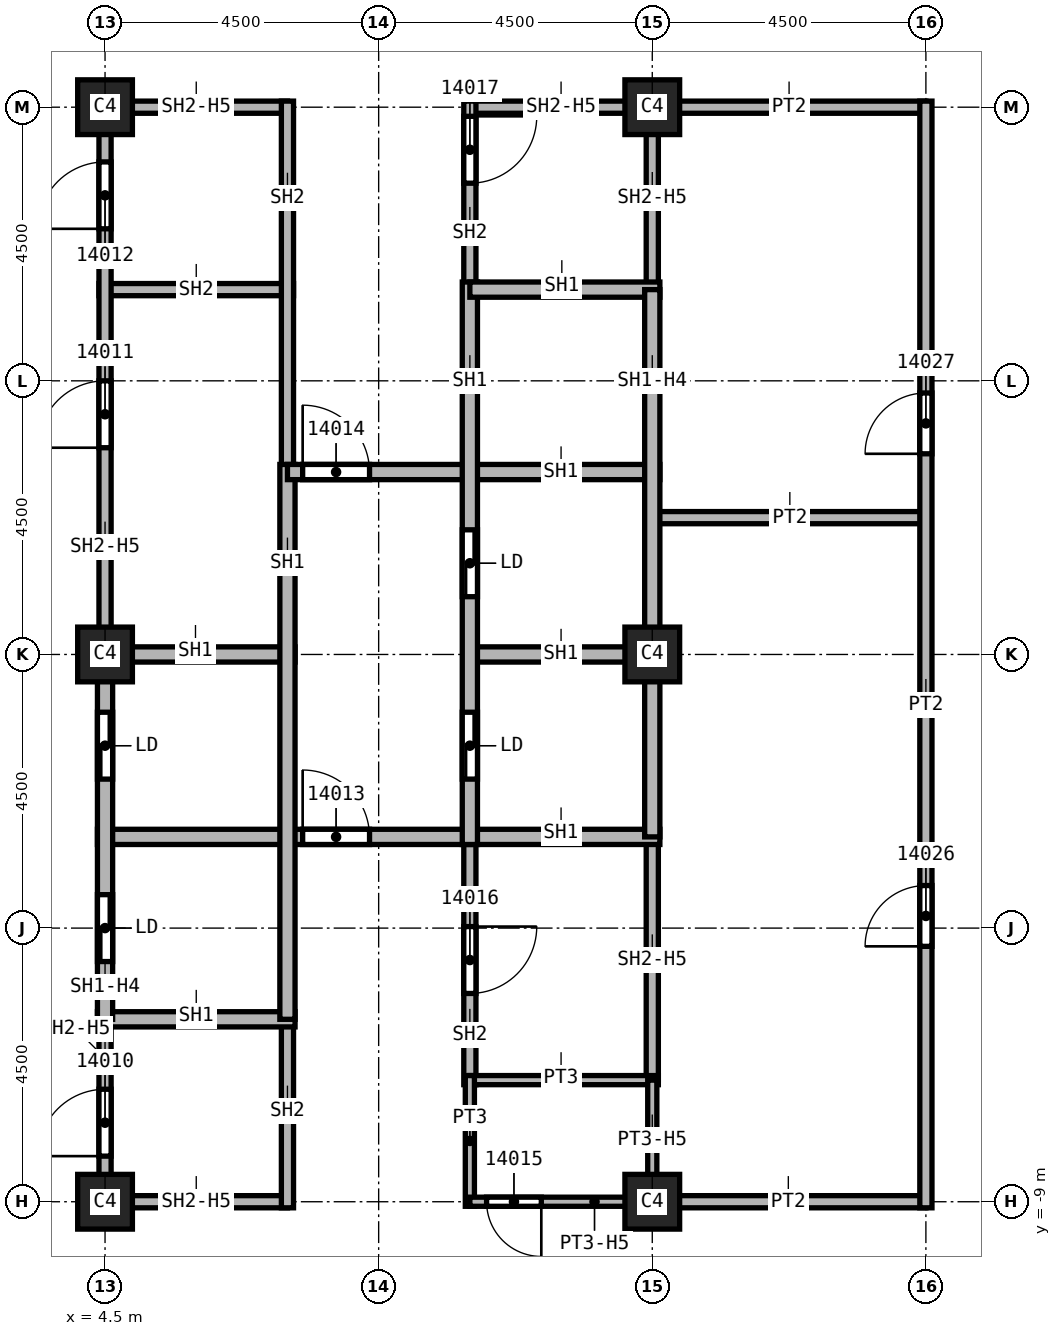
"""IFC4 building model, lengths in metres.
Left out: names, types, materials, properties, quantities, classifications, styles, units other than length and angle.
Written with IfcOpenShell. Run it as: python <this file> out.ifc"""

import sys

from ifc_helpers import new_model, si_unit, direction, frame, frame_2d, origin, origin_2d, place, context, subcontext, project, spatial, rectangle, extrude, element, fill, save


model = new_model("IFC4")
c1 = context("Model", 3, precision=1e-05, world=origin(), true_north=direction((0.0, 1.0)))
c2 = subcontext(c1, "Body", "Model", "MODEL_VIEW")
j1 = project(units=[si_unit("LENGTHUNIT", "METRE"), si_unit("PLANEANGLEUNIT", "RADIAN")], contexts=[c1])
p1 = place(None, origin())
s1 = spatial("IfcSite", under=j1, at=p1, CompositionType="ELEMENT")
p2 = place(p1, origin())
s2 = spatial("IfcBuilding", under=s1, at=p2, CompositionType="ELEMENT")
p3 = place(p2, frame((0.0, 0.0, 224.0)))
s3 = spatial("IfcBuildingStorey", under=s2, at=p3, CompositionType="ELEMENT", Elevation=224.0)
for number, where, z_axis, x_axis in (
    (1, (4.5, 0.0, 0.0), (0.0, 0.0, 1.0), (1.0, 0.0, 0.0)),
    (2, (4.5, 9.0, 0.0), (0.0, 0.0, 1.0), (1.0, 0.0, 0.0)),
    (3, (4.5, -9.0, 0.0), (0.0, 0.0, 1.0), (1.0, 0.0, 0.0)),
    (4, (13.5, 0.0, 0.0), (0.0, 0.0, 1.0), (1.0, 0.0, 0.0)),
    (5, (13.5, 9.0, 0.0), (0.0, 0.0, 1.0), (1.0, 0.0, 0.0)),
    (6, (13.5, -9.0, 0.0), (0.0, 0.0, 1.0), (1.0, 0.0, 0.0)),
):
    element("IfcColumn", number, at=place(p3, frame(where, z_axis=z_axis, x_axis=x_axis)), inside=s3, PredefinedType="COLUMN", context=c2, shape_type="SweptSolid", body=[
        extrude(rectangle(XDim=0.9, YDim=0.9, at=origin_2d()), origin(), (0.0, 0.0, 1.0), 3.72),
    ])
for number, where, z_axis, x_axis in (
    (7, (13.5, -9.0, 0.0), (0.0, 0.0, 1.0), (1.0, 0.0, 0.0)),
    (8, (13.5, 2.25, 0.0), (0.0, 0.0, 1.0), (1.0, 0.0, 0.0)),
    (9, (18.0, 9.0, 0.0), (0.0, 0.0, 1.0), (-1.0, 0.0, 0.0)),
):
    element("IfcWall", number, at=place(p3, frame(where, z_axis=z_axis, x_axis=x_axis)), inside=s3, PredefinedType="PARTITIONING", context=c2, shape_type="SweptSolid", body=[
        extrude(rectangle(XDim=4.5, YDim=0.2, at=frame_2d((2.25, 0.0))), origin(), (0.0, 0.0, 1.0), 3.72),
    ])
p4 = place(p3, frame((18.0, -9.1, 0.0), z_axis=(0.0, 0.0, 1.0), x_axis=(0.0, 1.0, 0.0)))
e10 = element("IfcWall", 10, at=p4, inside=s3, PredefinedType="PARTITIONING", context=c2, shape_type="SweptSolid", body=[
    extrude(rectangle(XDim=18.2, YDim=0.2, at=frame_2d((9.1, 0.0))), origin(), (0.0, 0.0, 1.0), 3.72),
])
p5 = place(p4, frame((4.3, 0.0, 0.0)))
e11 = element("IfcOpeningElement", 11, at=p5, cuts=e10, PredefinedType="OPENING", context=c2, shape_type="SweptSolid", body=[
    extrude(rectangle(XDim=1.0, YDim=2.1, at=frame_2d((0.5, 1.05))), frame((0.0, 0.1, 0.0), z_axis=(0.0, -1.0, 0.0), x_axis=(1.0, 0.0, 0.0)), (0.0, 0.0, 1.0), 0.2),
])
p6 = place(p4, frame((12.4, 0.0, 0.0)))
e12 = element("IfcOpeningElement", 12, at=p6, cuts=e10, PredefinedType="OPENING", context=c2, shape_type="SweptSolid", body=[
    extrude(rectangle(XDim=1.0, YDim=2.1, at=frame_2d((0.5, 1.05))), frame((0.0, 0.1, 0.0), z_axis=(0.0, -1.0, 0.0), x_axis=(1.0, 0.0, 0.0)), (0.0, 0.0, 1.0), 0.2),
])
p7 = place(p3, frame((4.4, 6.0, 0.0), z_axis=(0.0, 0.0, 1.0), x_axis=(1.0, 0.0, 0.0)))
e13 = element("IfcWall", 13, at=p7, inside=s3, PredefinedType="SOLIDWALL", context=c2, shape_type="SweptSolid", body=[
    extrude(rectangle(XDim=3.2, YDim=0.2, at=frame_2d((1.6, 0.0))), origin(), (0.0, 0.0, 1.0), 3.72),
])
p8 = place(p3, frame((4.5, -9.1, 0.0), z_axis=(0.0, 0.0, 1.0), x_axis=(0.0, 1.0, 0.0)))
e14 = element("IfcWall", 14, at=p8, inside=s3, PredefinedType="SOLIDWALL", context=c2, shape_type="SweptSolid", body=[
    extrude(rectangle(XDim=3.1, YDim=0.2, at=frame_2d((1.55, 0.0))), origin(), (0.0, 0.0, 1.0), 2.958),
])
p9 = place(p8, frame((0.85, 0.0, 0.0)))
e15 = element("IfcOpeningElement", 15, at=p9, cuts=e14, PredefinedType="OPENING", context=c2, shape_type="SweptSolid", body=[
    extrude(rectangle(XDim=1.1, YDim=2.1, at=frame_2d((0.55, 1.05))), frame((0.0, 0.1, 0.0), z_axis=(0.0, -1.0, 0.0), x_axis=(1.0, 0.0, 0.0)), (0.0, 0.0, 1.0), 0.2),
])
p10 = place(p3, frame((4.5, 0.0, 0.0), z_axis=(0.0, 0.0, 1.0), x_axis=(0.0, 1.0, 0.0)))
e16 = element("IfcWall", 16, at=p10, inside=s3, PredefinedType="SOLIDWALL", context=c2, shape_type="SweptSolid", body=[
    extrude(rectangle(XDim=9.1, YDim=0.2, at=frame_2d((4.55, 0.0))), origin(), (0.0, 0.0, 1.0), 2.958),
])
p11 = place(p10, frame((3.4, 0.0, 0.0)))
e17 = element("IfcOpeningElement", 17, at=p11, cuts=e16, PredefinedType="OPENING", context=c2, shape_type="SweptSolid", body=[
    extrude(rectangle(XDim=1.1, YDim=2.1, at=frame_2d((0.55, 1.05))), frame((0.0, 0.1, 0.0), z_axis=(0.0, -1.0, 0.0), x_axis=(1.0, 0.0, 0.0)), (0.0, 0.0, 1.0), 0.2),
])
p12 = place(p10, frame((7.0, 0.0, 0.0)))
e18 = element("IfcOpeningElement", 18, at=p12, cuts=e16, PredefinedType="OPENING", context=c2, shape_type="SweptSolid", body=[
    extrude(rectangle(XDim=1.1, YDim=2.1, at=frame_2d((0.55, 1.05))), frame((0.0, 0.1, 0.0), z_axis=(0.0, -1.0, 0.0), x_axis=(1.0, 0.0, 0.0)), (0.0, 0.0, 1.0), 0.2),
])
for number, where, z_axis, x_axis in (
    (19, (4.5, 9.0, 0.0), (0.0, 0.0, 1.0), (1.0, 0.0, 0.0)),
    (20, (7.5, -9.0, 0.0), (0.0, 0.0, 1.0), (-1.0, 0.0, 0.0)),
):
    element("IfcWall", number, at=place(p3, frame(where, z_axis=z_axis, x_axis=x_axis)), inside=s3, PredefinedType="SOLIDWALL", context=c2, shape_type="SweptSolid", body=[
        extrude(rectangle(XDim=3.0, YDim=0.2, at=frame_2d((1.5, 0.0))), origin(), (0.0, 0.0, 1.0), 2.958),
    ])
p13 = place(p3, frame((7.5, -6.0, 0.0), z_axis=(0.0, 0.0, 1.0), x_axis=(0.0, -1.0, 0.0)))
e21 = element("IfcWall", 21, at=p13, inside=s3, PredefinedType="SOLIDWALL", context=c2, shape_type="SweptSolid", body=[
    extrude(rectangle(XDim=3.1, YDim=0.2, at=frame_2d((1.55, 0.0))), origin(), (0.0, 0.0, 1.0), 3.72),
])
p14 = place(p3, frame((7.5, 9.1, 0.0), z_axis=(0.0, 0.0, 1.0), x_axis=(0.0, -1.0, 0.0)))
e22 = element("IfcWall", 22, at=p14, inside=s3, PredefinedType="SOLIDWALL", context=c2, shape_type="SweptSolid", body=[
    extrude(rectangle(XDim=6.225, YDim=0.2, at=frame_2d((3.113, 0.0))), origin(), (0.0, 0.0, 1.0), 3.72),
])
p15 = place(p3, frame((10.5, -2.875, 0.0), z_axis=(0.0, 0.0, 1.0), x_axis=(0.0, -1.0, 0.0)))
e23 = element("IfcWall", 23, at=p15, inside=s3, PredefinedType="SOLIDWALL", context=c2, shape_type="SweptSolid", body=[
    extrude(rectangle(XDim=4.2, YDim=0.2, at=frame_2d((2.1, 0.0))), origin(), (0.0, 0.0, 1.0), 3.72),
])
p16 = place(p15, frame((1.6, 0.0, 0.0)))
e24 = element("IfcOpeningElement", 24, at=p16, cuts=e23, PredefinedType="OPENING", context=c2, shape_type="SweptSolid", body=[
    extrude(rectangle(XDim=1.1, YDim=2.1, at=frame_2d((0.55, 1.05))), frame((0.0, 0.1, 0.0), z_axis=(0.0, -1.0, 0.0), x_axis=(1.0, 0.0, 0.0)), (0.0, 0.0, 1.0), 0.2),
])
p17 = place(p3, frame((10.5, 9.0, 0.0), z_axis=(0.0, 0.0, 1.0), x_axis=(1.0, 0.0, 0.0)))
e25 = element("IfcWall", 25, at=p17, inside=s3, PredefinedType="SOLIDWALL", context=c2, shape_type="SweptSolid", body=[
    extrude(rectangle(XDim=3.1, YDim=0.2, at=frame_2d((1.55, 0.0))), origin(), (0.0, 0.0, 1.0), 2.958),
])
p18 = place(p3, frame((10.5, 9.1, 0.0), z_axis=(0.0, 0.0, 1.0), x_axis=(0.0, -1.0, 0.0)))
e26 = element("IfcWall", 26, at=p18, inside=s3, PredefinedType="SOLIDWALL", context=c2, shape_type="SweptSolid", body=[
    extrude(rectangle(XDim=3.225, YDim=0.2, at=frame_2d((1.613, 0.0))), origin(), (0.0, 0.0, 1.0), 3.72),
])
p19 = place(p18, frame((0.25, 0.0, 0.0)))
e27 = element("IfcOpeningElement", 27, at=p19, cuts=e26, PredefinedType="OPENING", context=c2, shape_type="SweptSolid", body=[
    extrude(rectangle(XDim=1.1, YDim=2.1, at=frame_2d((0.55, 1.05))), frame((0.0, 0.1, 0.0), z_axis=(0.0, -1.0, 0.0), x_axis=(1.0, 0.0, 0.0)), (0.0, 0.0, 1.0), 0.2),
])
p20 = place(p3, frame((13.5, -3.0, 0.0), z_axis=(0.0, 0.0, 1.0), x_axis=(0.0, -1.0, 0.0)))
e28 = element("IfcWall", 28, at=p20, inside=s3, PredefinedType="SOLIDWALL", context=c2, shape_type="SweptSolid", body=[
    extrude(rectangle(XDim=4.0, YDim=0.2, at=frame_2d((2.0, 0.0))), origin(), (0.0, 0.0, 1.0), 2.958),
])
p21 = place(p3, frame((13.5, 9.1, 0.0), z_axis=(0.0, 0.0, 1.0), x_axis=(0.0, -1.0, 0.0)))
e29 = element("IfcWall", 29, at=p21, inside=s3, PredefinedType="SOLIDWALL", context=c2, shape_type="SweptSolid", body=[
    extrude(rectangle(XDim=3.1, YDim=0.2, at=frame_2d((1.55, 0.0))), origin(), (0.0, 0.0, 1.0), 2.958),
])
p22 = place(p3, frame((4.375, -6.0, 0.0), z_axis=(0.0, 0.0, 1.0), x_axis=(1.0, 0.0, 0.0)))
e30 = element("IfcWall", 30, at=p22, inside=s3, PredefinedType="SOLIDWALL", context=c2, shape_type="SweptSolid", body=[
    extrude(rectangle(XDim=3.25, YDim=0.25, at=frame_2d((1.625, 0.0))), origin(), (0.0, 0.0, 1.0), 3.72),
])
p23 = place(p3, frame((4.375, -3.0, 0.0), z_axis=(0.0, 0.0, 1.0), x_axis=(1.0, 0.0, 0.0)))
e31 = element("IfcWall", 31, at=p23, inside=s3, PredefinedType="SOLIDWALL", context=c2, shape_type="SweptSolid", body=[
    extrude(rectangle(XDim=9.25, YDim=0.25, at=frame_2d((4.625, 0.0))), origin(), (0.0, 0.0, 1.0), 3.72),
])
p24 = place(p23, frame((3.375, 0.0, 0.0)))
e32 = element("IfcOpeningElement", 32, at=p24, cuts=e31, PredefinedType="OPENING", context=c2, shape_type="SweptSolid", body=[
    extrude(rectangle(XDim=1.1, YDim=2.1, at=frame_2d((0.55, 1.05))), frame((0.0, 0.125, 0.0), z_axis=(0.0, -1.0, 0.0), x_axis=(1.0, 0.0, 0.0)), (0.0, 0.0, 1.0), 0.25),
])
p25 = place(p3, frame((4.375, 0.0, 0.0), z_axis=(0.0, 0.0, 1.0), x_axis=(1.0, 0.0, 0.0)))
e33 = element("IfcWall", 33, at=p25, inside=s3, PredefinedType="SOLIDWALL", context=c2, shape_type="SweptSolid", body=[
    extrude(rectangle(XDim=3.25, YDim=0.25, at=frame_2d((1.625, 0.0))), origin(), (0.0, 0.0, 1.0), 3.72),
])
p26 = place(p3, frame((4.5, -6.0, 0.0), z_axis=(0.0, 0.0, 1.0), x_axis=(0.0, 1.0, 0.0)))
e34 = element("IfcWall", 34, at=p26, inside=s3, PredefinedType="SOLIDWALL", context=c2, shape_type="SweptSolid", body=[
    extrude(rectangle(XDim=6.0, YDim=0.25, at=frame_2d((3.0, 0.0))), origin(), (0.0, 0.0, 1.0), 2.958),
])
p27 = place(p26, frame((0.95, 0.0, 0.0)))
e35 = element("IfcOpeningElement", 35, at=p27, cuts=e34, PredefinedType="OPENING", context=c2, shape_type="SweptSolid", body=[
    extrude(rectangle(XDim=1.1, YDim=2.1, at=frame_2d((0.55, 1.05))), frame((0.0, 0.125, 0.0), z_axis=(0.0, -1.0, 0.0), x_axis=(1.0, 0.0, 0.0)), (0.0, 0.0, 1.0), 0.25),
])
p28 = place(p26, frame((3.95, 0.0, 0.0)))
e36 = element("IfcOpeningElement", 36, at=p28, cuts=e34, PredefinedType="OPENING", context=c2, shape_type="SweptSolid", body=[
    extrude(rectangle(XDim=1.1, YDim=2.1, at=frame_2d((0.55, 1.05))), frame((0.0, 0.125, 0.0), z_axis=(0.0, -1.0, 0.0), x_axis=(1.0, 0.0, 0.0)), (0.0, 0.0, 1.0), 0.25),
])
p29 = place(p3, frame((7.5, 3.125, 0.0), z_axis=(0.0, 0.0, 1.0), x_axis=(0.0, -1.0, 0.0)))
e37 = element("IfcWall", 37, at=p29, inside=s3, PredefinedType="SOLIDWALL", context=c2, shape_type="SweptSolid", body=[
    extrude(rectangle(XDim=9.125, YDim=0.25, at=frame_2d((4.562, 0.0))), origin(), (0.0, 0.0, 1.0), 3.72),
])
p30 = place(p3, frame((7.5, 3.0, 0.0), z_axis=(0.0, 0.0, 1.0), x_axis=(1.0, 0.0, 0.0)))
e38 = element("IfcWall", 38, at=p30, inside=s3, PredefinedType="SOLIDWALL", context=c2, shape_type="SweptSolid", body=[
    extrude(rectangle(XDim=6.125, YDim=0.25, at=frame_2d((3.062, 0.0))), origin(), (0.0, 0.0, 1.0), 3.72),
])
p31 = place(p30, frame((0.25, 0.0, 0.0)))
e39 = element("IfcOpeningElement", 39, at=p31, cuts=e38, PredefinedType="OPENING", context=c2, shape_type="SweptSolid", body=[
    extrude(rectangle(XDim=1.1, YDim=2.1, at=frame_2d((0.55, 1.05))), frame((0.0, 0.125, 0.0), z_axis=(0.0, -1.0, 0.0), x_axis=(1.0, 0.0, 0.0)), (0.0, 0.0, 1.0), 0.25),
])
p32 = place(p3, frame((10.5, 0.0, 0.0), z_axis=(0.0, 0.0, 1.0), x_axis=(1.0, 0.0, 0.0)))
e40 = element("IfcWall", 40, at=p32, inside=s3, PredefinedType="SOLIDWALL", context=c2, shape_type="SweptSolid", body=[
    extrude(rectangle(XDim=3.125, YDim=0.25, at=frame_2d((1.562, 0.0))), origin(), (0.0, 0.0, 1.0), 3.72),
])
p33 = place(p3, frame((10.5, 6.125, 0.0), z_axis=(0.0, 0.0, 1.0), x_axis=(0.0, -1.0, 0.0)))
e41 = element("IfcWall", 41, at=p33, inside=s3, PredefinedType="SOLIDWALL", context=c2, shape_type="SweptSolid", body=[
    extrude(rectangle(XDim=9.25, YDim=0.25, at=frame_2d((4.625, 0.0))), origin(), (0.0, 0.0, 1.0), 3.72),
])
p34 = place(p33, frame((7.075, 0.0, 0.0)))
e42 = element("IfcOpeningElement", 42, at=p34, cuts=e41, PredefinedType="OPENING", context=c2, shape_type="SweptSolid", body=[
    extrude(rectangle(XDim=1.1, YDim=2.1, at=frame_2d((0.55, 1.05))), frame((0.0, 0.125, 0.0), z_axis=(0.0, -1.0, 0.0), x_axis=(1.0, 0.0, 0.0)), (0.0, 0.0, 1.0), 0.25),
])
p35 = place(p33, frame((4.075, 0.0, 0.0)))
e43 = element("IfcOpeningElement", 43, at=p35, cuts=e41, PredefinedType="OPENING", context=c2, shape_type="SweptSolid", body=[
    extrude(rectangle(XDim=1.1, YDim=2.1, at=frame_2d((0.55, 1.05))), frame((0.0, 0.125, 0.0), z_axis=(0.0, -1.0, 0.0), x_axis=(1.0, 0.0, 0.0)), (0.0, 0.0, 1.0), 0.25),
])
p36 = place(p3, frame((10.5, 6.0, 0.0), z_axis=(0.0, 0.0, 1.0), x_axis=(1.0, 0.0, 0.0)))
e44 = element("IfcWall", 44, at=p36, inside=s3, PredefinedType="SOLIDWALL", context=c2, shape_type="SweptSolid", body=[
    extrude(rectangle(XDim=3.125, YDim=0.25, at=frame_2d((1.562, 0.0))), origin(), (0.0, 0.0, 1.0), 3.72),
])
p37 = place(p3, frame((13.5, 6.0, 0.0), z_axis=(0.0, 0.0, 1.0), x_axis=(0.0, -1.0, 0.0)))
e45 = element("IfcWall", 45, at=p37, inside=s3, PredefinedType="SOLIDWALL", context=c2, shape_type="SweptSolid", body=[
    extrude(rectangle(XDim=9.0, YDim=0.25, at=frame_2d((4.5, 0.0))), origin(), (0.0, 0.0, 1.0), 2.958),
])
p38 = place(p3, frame((10.5, -7.0, 0.0), z_axis=(0.0, 0.0, 1.0), x_axis=(1.0, 0.0, 0.0)))
e46 = element("IfcWall", 46, at=p38, inside=s3, PredefinedType="PARTITIONING", context=c2, shape_type="SweptSolid", body=[
    extrude(rectangle(XDim=3.1, YDim=0.15, at=frame_2d((1.55, 0.0))), origin(), (0.0, 0.0, 1.0), 3.72),
])
p39 = place(p3, frame((10.5, -6.925, 0.0), z_axis=(0.0, 0.0, 1.0), x_axis=(0.0, -1.0, 0.0)))
e47 = element("IfcWall", 47, at=p39, inside=s3, PredefinedType="PARTITIONING", context=c2, shape_type="SweptSolid", body=[
    extrude(rectangle(XDim=2.15, YDim=0.15, at=frame_2d((1.075, 0.0))), origin(), (0.0, 0.0, 1.0), 3.72),
])
p40 = place(p3, frame((13.5, -7.0, 0.0), z_axis=(0.0, 0.0, 1.0), x_axis=(0.0, -1.0, 0.0)))
e48 = element("IfcWall", 48, at=p40, inside=s3, PredefinedType="PARTITIONING", context=c2, shape_type="SweptSolid", body=[
    extrude(rectangle(XDim=2.1, YDim=0.15, at=frame_2d((1.05, 0.0))), origin(), (0.0, 0.0, 1.0), 2.958),
])
p41 = place(p3, frame((13.575, -9.0, 0.0), z_axis=(0.0, 0.0, 1.0), x_axis=(-1.0, 0.0, 0.0)))
e49 = element("IfcWall", 49, at=p41, inside=s3, PredefinedType="PARTITIONING", context=c2, shape_type="SweptSolid", body=[
    extrude(rectangle(XDim=3.075, YDim=0.15, at=frame_2d((1.538, 0.0))), origin(), (0.0, 0.0, 1.0), 2.958),
])
p42 = place(p41, frame((1.9, 0.0, 0.0)))
e50 = element("IfcOpeningElement", 50, at=p42, cuts=e49, PredefinedType="OPENING", context=c2, shape_type="SweptSolid", body=[
    extrude(rectangle(XDim=0.9, YDim=2.1, at=frame_2d((0.45, 1.05))), frame((0.0, 0.075, 0.0), z_axis=(0.0, -1.0, 0.0), x_axis=(1.0, 0.0, 0.0)), (0.0, 0.0, 1.0), 0.15),
])
p43 = place(p9, origin())
e51 = element("IfcDoor", 51, at=p43, inside=s3, OperationType="SINGLE_SWING_LEFT", PredefinedType="DOOR", context=c2, shape_type="SweptSolid", body=[
    extrude(rectangle(XDim=1.1, YDim=2.1, at=frame_2d((0.55, 1.05))), frame((0.0, 0.025, 0.0), z_axis=(0.0, -1.0, 0.0), x_axis=(1.0, 0.0, 0.0)), (0.0, 0.0, 1.0), 0.05),
])
fill(e15, e51)
p44 = place(p11, origin())
e52 = element("IfcDoor", 52, at=p44, inside=s3, OperationType="SINGLE_SWING_RIGHT", PredefinedType="DOOR", context=c2, shape_type="SweptSolid", body=[
    extrude(rectangle(XDim=1.1, YDim=2.1, at=frame_2d((0.55, 1.05))), frame((0.0, 0.025, 0.0), z_axis=(0.0, -1.0, 0.0), x_axis=(1.0, 0.0, 0.0)), (0.0, 0.0, 1.0), 0.05),
])
fill(e17, e52)
p45 = place(p12, origin())
e53 = element("IfcDoor", 53, at=p45, inside=s3, OperationType="SINGLE_SWING_LEFT", PredefinedType="DOOR", context=c2, shape_type="SweptSolid", body=[
    extrude(rectangle(XDim=1.1, YDim=2.1, at=frame_2d((0.55, 1.05))), frame((0.0, 0.025, 0.0), z_axis=(0.0, -1.0, 0.0), x_axis=(1.0, 0.0, 0.0)), (0.0, 0.0, 1.0), 0.05),
])
fill(e18, e53)
p46 = place(p24, origin())
e54 = element("IfcDoor", 54, at=p46, inside=s3, OperationType="SINGLE_SWING_RIGHT", PredefinedType="DOOR", context=c2, shape_type="SweptSolid", body=[
    extrude(rectangle(XDim=1.1, YDim=2.1, at=frame_2d((0.55, 1.05))), frame((0.0, 0.025, 0.0), z_axis=(0.0, -1.0, 0.0), x_axis=(1.0, 0.0, 0.0)), (0.0, 0.0, 1.0), 0.05),
])
fill(e32, e54)
p47 = place(p31, origin())
e55 = element("IfcDoor", 55, at=p47, inside=s3, OperationType="SINGLE_SWING_LEFT", PredefinedType="DOOR", context=c2, shape_type="SweptSolid", body=[
    extrude(rectangle(XDim=1.1, YDim=2.1, at=frame_2d((0.55, 1.05))), frame((0.0, 0.025, 0.0), z_axis=(0.0, -1.0, 0.0), x_axis=(1.0, 0.0, 0.0)), (0.0, 0.0, 1.0), 0.05),
])
fill(e39, e55)
p48 = place(p42, origin())
e56 = element("IfcDoor", 56, at=p48, inside=s3, OperationType="SINGLE_SWING_RIGHT", PredefinedType="DOOR", context=c2, shape_type="SweptSolid", body=[
    extrude(rectangle(XDim=0.9, YDim=2.1, at=frame_2d((0.45, 1.05))), frame((0.0, 0.025, 0.0), z_axis=(0.0, -1.0, 0.0), x_axis=(1.0, 0.0, 0.0)), (0.0, 0.0, 1.0), 0.05),
])
fill(e50, e56)
p49 = place(p16, origin())
e57 = element("IfcDoor", 57, at=p49, inside=s3, OperationType="SINGLE_SWING_LEFT", PredefinedType="DOOR", context=c2, shape_type="SweptSolid", body=[
    extrude(rectangle(XDim=1.1, YDim=2.1, at=frame_2d((0.55, 1.05))), frame((0.0, 0.025, 0.0), z_axis=(0.0, -1.0, 0.0), x_axis=(1.0, 0.0, 0.0)), (0.0, 0.0, 1.0), 0.05),
])
fill(e24, e57)
p50 = place(p19, origin())
e58 = element("IfcDoor", 58, at=p50, inside=s3, OperationType="SINGLE_SWING_RIGHT", PredefinedType="DOOR", context=c2, shape_type="SweptSolid", body=[
    extrude(rectangle(XDim=1.1, YDim=2.1, at=frame_2d((0.55, 1.05))), frame((0.0, 0.025, 0.0), z_axis=(0.0, -1.0, 0.0), x_axis=(1.0, 0.0, 0.0)), (0.0, 0.0, 1.0), 0.05),
])
fill(e27, e58)
p51 = place(p5, origin())
e59 = element("IfcDoor", 59, at=p51, inside=s3, OperationType="SINGLE_SWING_LEFT", PredefinedType="DOOR", context=c2, shape_type="SweptSolid", body=[
    extrude(rectangle(XDim=1.0, YDim=2.1, at=frame_2d((0.5, 1.05))), frame((0.0, 0.025, 0.0), z_axis=(0.0, -1.0, 0.0), x_axis=(1.0, 0.0, 0.0)), (0.0, 0.0, 1.0), 0.05),
])
fill(e11, e59)
p52 = place(p6, origin())
e60 = element("IfcDoor", 60, at=p52, inside=s3, OperationType="SINGLE_SWING_RIGHT", PredefinedType="DOOR", context=c2, shape_type="SweptSolid", body=[
    extrude(rectangle(XDim=1.0, YDim=2.1, at=frame_2d((0.5, 1.05))), frame((0.0, 0.025, 0.0), z_axis=(0.0, -1.0, 0.0), x_axis=(1.0, 0.0, 0.0)), (0.0, 0.0, 1.0), 0.05),
])
fill(e12, e60)
p53 = place(p27, origin())
e61 = element("IfcDoor", 61, at=p53, inside=s3, OperationType="SLIDING_TO_LEFT", PredefinedType="DOOR", context=c2, shape_type="SweptSolid", body=[
    extrude(rectangle(XDim=1.1, YDim=2.1, at=frame_2d((0.55, 1.05))), frame((0.0, 0.025, 0.0), z_axis=(0.0, -1.0, 0.0), x_axis=(1.0, 0.0, 0.0)), (0.0, 0.0, 1.0), 0.05),
])
fill(e35, e61)
p54 = place(p28, origin())
e62 = element("IfcDoor", 62, at=p54, inside=s3, OperationType="SLIDING_TO_LEFT", PredefinedType="DOOR", context=c2, shape_type="SweptSolid", body=[
    extrude(rectangle(XDim=1.1, YDim=2.1, at=frame_2d((0.55, 1.05))), frame((0.0, 0.025, 0.0), z_axis=(0.0, -1.0, 0.0), x_axis=(1.0, 0.0, 0.0)), (0.0, 0.0, 1.0), 0.05),
])
fill(e36, e62)
p55 = place(p34, origin())
e63 = element("IfcDoor", 63, at=p55, inside=s3, OperationType="SLIDING_TO_LEFT", PredefinedType="DOOR", context=c2, shape_type="SweptSolid", body=[
    extrude(rectangle(XDim=1.1, YDim=2.1, at=frame_2d((0.55, 1.05))), frame((0.0, 0.025, 0.0), z_axis=(0.0, -1.0, 0.0), x_axis=(1.0, 0.0, 0.0)), (0.0, 0.0, 1.0), 0.05),
])
fill(e42, e63)
p56 = place(p35, origin())
e64 = element("IfcDoor", 64, at=p56, inside=s3, OperationType="SLIDING_TO_LEFT", PredefinedType="DOOR", context=c2, shape_type="SweptSolid", body=[
    extrude(rectangle(XDim=1.1, YDim=2.1, at=frame_2d((0.55, 1.05))), frame((0.0, 0.025, 0.0), z_axis=(0.0, -1.0, 0.0), x_axis=(1.0, 0.0, 0.0)), (0.0, 0.0, 1.0), 0.05),
])
fill(e43, e64)
save(model, sys.argv[1])
